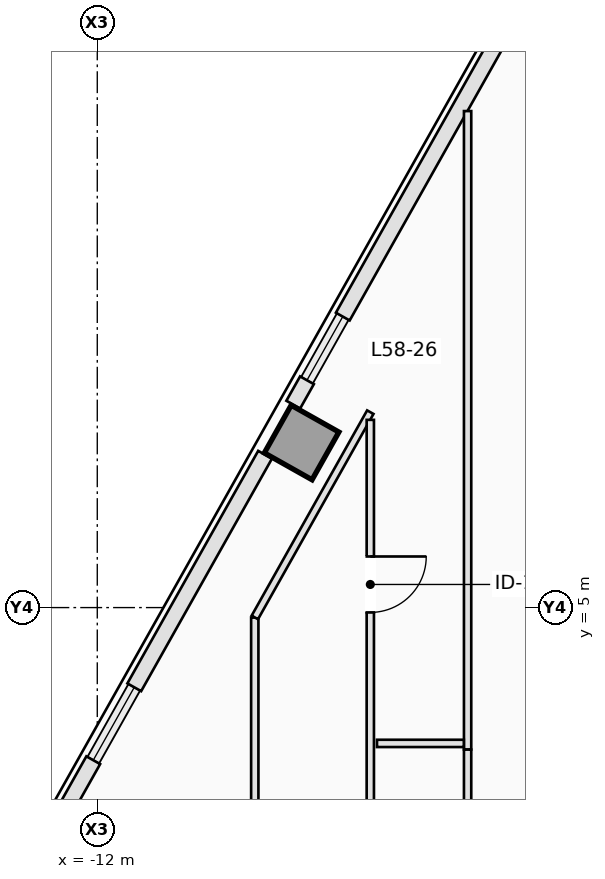
"""IFC4 building model, lengths in metres.
Left out: names, types, materials, properties, quantities, classifications, styles, units other than length and angle.
Written with IfcOpenShell. Run it as: python <this file> out.ifc"""

import sys

from ifc_helpers import new_model, si_unit, direction, frame, frame_2d, origin, origin_2d, place, context, subcontext, project, spatial, rectangle, extrude, element, fill, save


model = new_model("IFC4")
c1 = context("Model", 3, precision=1e-05, world=origin(), true_north=direction((0.0, 1.0)))
c2 = subcontext(c1, "Body", "Model", "MODEL_VIEW")
j1 = project(units=[si_unit("LENGTHUNIT", "METRE"), si_unit("PLANEANGLEUNIT", "RADIAN")], contexts=[c1])
p1 = place(None, origin())
s1 = spatial("IfcSite", under=j1, at=p1, CompositionType="ELEMENT")
p2 = place(p1, origin())
s2 = spatial("IfcBuilding", under=s1, at=p2, CompositionType="ELEMENT")
p3 = place(p2, frame((0.0, 0.0, 211.4)))
s3 = spatial("IfcBuildingStorey", under=s2, at=p3, CompositionType="ELEMENT", Elevation=211.4)
p4 = place(p3, frame((-8.64, 7.715, 0.0), z_axis=(0.0, 0.0, 1.0), x_axis=(-0.871575139605, 0.490261946333, 0.0)))
e1 = element("IfcColumn", 1, at=p4, inside=s3, PredefinedType="COLUMN", context=c2, shape_type="SweptSolid", body=[
    extrude(rectangle(XDim=0.9, YDim=0.9, at=origin_2d()), origin(), (0.0, 0.0, 1.0), 3.5),
])
p5 = place(p3, frame((-8.777, 8.337, 0.0), z_axis=(0.0, 0.0, 1.0), x_axis=(0.490412424957, 0.871490478116, 0.0)))
e2 = element("IfcWall", 2, at=p5, inside=s3, PredefinedType="STANDARD", context=c2, shape_type="SweptSolid", body=[
    extrude(rectangle(XDim=0.46, YDim=0.26, at=frame_2d((0.23, 0.0))), origin(), (0.0, 0.0, 1.0), 3.25),
])
p6 = place(p3, frame((-7.962, 9.785, 0.0), z_axis=(0.0, 0.0, 1.0), x_axis=(0.490240608828, 0.871587141631, 0.0)))
e3 = element("IfcWall", 3, at=p6, inside=s3, PredefinedType="STANDARD", context=c2, shape_type="SweptSolid", body=[
    extrude(rectangle(XDim=5.618, YDim=0.26, at=frame_2d((2.809, 0.0))), origin(), (0.0, 0.0, 1.0), 3.25),
])
p7 = place(p3, frame((-14.217, -1.334, 0.0), z_axis=(0.0, 0.0, 1.0), x_axis=(0.490261239633, 0.871575537125, 0.0)))
e4 = element("IfcWall", 4, at=p7, inside=s3, PredefinedType="STANDARD", context=c2, shape_type="SweptSolid", body=[
    extrude(rectangle(XDim=4.388, YDim=0.26, at=frame_2d((2.194, 0.0))), origin(), (0.0, 0.0, 1.0), 3.25),
])
p8 = place(p3, frame((-11.392, 3.689, 0.0), z_axis=(0.0, 0.0, 1.0), x_axis=(0.490237464814, 0.871588910033, 0.0)))
e5 = element("IfcWall", 5, at=p8, inside=s3, PredefinedType="STANDARD", context=c2, shape_type="SweptSolid", body=[
    extrude(rectangle(XDim=4.388, YDim=0.26, at=frame_2d((2.194, 0.0))), origin(), (0.0, 0.0, 1.0), 3.25),
])
p9 = place(p3, frame((-9.41, -2.338, 0.0), z_axis=(0.0, 0.0, 1.0), x_axis=(0.0, 1.0, 0.0)))
e6 = element("IfcWall", 6, at=p9, inside=s3, PredefinedType="PARTITIONING", context=c2, shape_type="SweptSolid", body=[
    extrude(rectangle(XDim=7.174, YDim=0.12, at=frame_2d((3.587, 0.0))), origin(), (0.0, 0.0, 1.0), 3.25),
])
p10 = place(p3, frame((-9.409, 4.838, 0.0), z_axis=(0.0, 0.0, 1.0), x_axis=(0.490276203052, 0.871567120032, 0.0)))
e7 = element("IfcWall", 7, at=p10, inside=s3, PredefinedType="PARTITIONING", context=c2, shape_type="SweptSolid", body=[
    extrude(rectangle(XDim=3.873, YDim=0.12, at=frame_2d((1.937, 0.0))), origin(), (0.0, 0.0, 1.0), 3.25),
])
p11 = place(p3, frame((-7.51, 8.087, 0.0), z_axis=(0.0, 0.0, 1.0), x_axis=(0.0, -1.0, 0.0)))
e8 = element("IfcWall", 8, at=p11, inside=s3, PredefinedType="PARTITIONING", context=c2, shape_type="SweptSolid", body=[
    extrude(rectangle(XDim=10.487, YDim=0.12, at=frame_2d((5.244, 0.0))), origin(), (0.0, 0.0, 1.0), 3.25),
])
p12 = place(p11, frame((2.247, 0.0, 0.0)))
e9 = element("IfcOpeningElement", 9, at=p12, cuts=e8, PredefinedType="OPENING", context=c2, shape_type="SweptSolid", body=[
    extrude(rectangle(XDim=0.92, YDim=2.12, at=frame_2d((0.46, 1.06))), frame((0.0, 0.07, 0.0), z_axis=(0.0, -1.0, 0.0), x_axis=(1.0, 0.0, 0.0)), (0.0, 0.0, 1.0), 0.14),
])
p13 = place(p11, frame((7.314, 0.0, 0.0)))
e10 = element("IfcOpeningElement", 10, at=p13, cuts=e8, PredefinedType="OPENING", context=c2, shape_type="SweptSolid", body=[
    extrude(rectangle(XDim=0.92, YDim=2.12, at=frame_2d((0.46, 1.06))), frame((0.0, 0.07, 0.0), z_axis=(0.0, -1.0, 0.0), x_axis=(1.0, 0.0, 0.0)), (0.0, 0.0, 1.0), 0.14),
])
p14 = place(p3, frame((-5.91, 2.667, 0.0), z_axis=(0.0, 0.0, 1.0), x_axis=(0.0, 1.0, 0.0)))
e11 = element("IfcWall", 11, at=p14, inside=s3, PredefinedType="PARTITIONING", context=c2, shape_type="SweptSolid", body=[
    extrude(rectangle(XDim=10.499, YDim=0.12, at=frame_2d((5.249, 0.0))), origin(), (0.0, 0.0, 1.0), 3.25),
])
p15 = place(p3, frame((-5.91, -2.29, 0.0), z_axis=(0.0, 0.0, 1.0), x_axis=(0.0, 1.0, 0.0)))
e12 = element("IfcWall", 12, at=p15, inside=s3, PredefinedType="PARTITIONING", context=c2, shape_type="SweptSolid", body=[
    extrude(rectangle(XDim=4.954, YDim=0.12, at=frame_2d((2.477, 0.0))), origin(), (0.0, 0.0, 1.0), 3.25),
])
p16 = place(p3, frame((-5.972, 2.766, 0.0), z_axis=(0.0, 0.0, 1.0), x_axis=(-1.0, 0.0, 0.0)))
e13 = element("IfcWall", 13, at=p16, inside=s3, PredefinedType="PARTITIONING", context=c2, shape_type="SweptSolid", body=[
    extrude(rectangle(XDim=1.428, YDim=0.12, at=frame_2d((0.714, 0.0))), origin(), (0.0, 0.0, 1.0), 2.943),
])
p17 = place(p12, origin())
e14 = element("IfcDoor", 14, at=p17, inside=s3, OperationType="SINGLE_SWING_LEFT", PredefinedType="DOOR", context=c2, shape_type="SweptSolid", body=[
    extrude(rectangle(XDim=0.92, YDim=2.12, at=frame_2d((0.46, 1.06))), frame((0.0, 0.025, 0.0), z_axis=(0.0, -1.0, 0.0), x_axis=(1.0, 0.0, 0.0)), (0.0, 0.0, 1.0), 0.05),
])
fill(e9, e14)
save(model, sys.argv[1])
